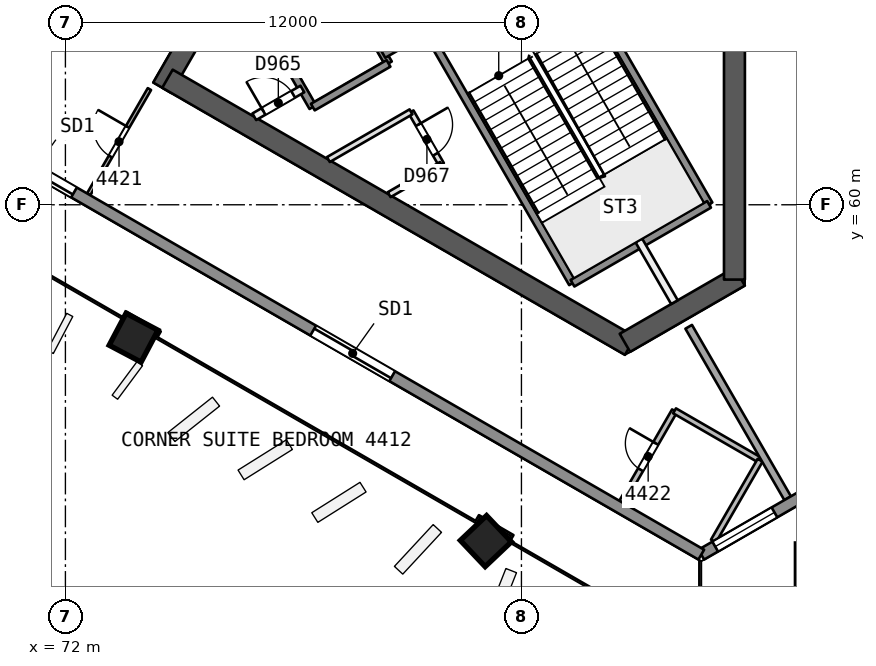
"""IFC4 building model, lengths in metres.
Left out: names, types, materials, properties, quantities, classifications, styles, units other than length and angle.
Written with IfcOpenShell. Run it as: python <this file> out.ifc"""

import sys

from ifc_helpers import new_model, si_unit, direction, frame, frame_2d, origin, origin_2d, place, context, subcontext, project, spatial, rectangle, extrude, element, fill, save


model = new_model("IFC4")
c1 = context("Model", 3, precision=1e-05, world=origin(), true_north=direction((0.0, 1.0)))
c2 = subcontext(c1, "Body", "Model", "MODEL_VIEW")
j1 = project(units=[si_unit("LENGTHUNIT", "METRE"), si_unit("PLANEANGLEUNIT", "RADIAN")], contexts=[c1])
p1 = place(None, origin())
s1 = spatial("IfcSite", under=j1, at=p1, CompositionType="ELEMENT")
p2 = place(p1, origin())
s2 = spatial("IfcBuilding", under=s1, at=p2, CompositionType="ELEMENT")
p3 = place(p2, frame((0.0, 0.0, 182.2)))
s3 = spatial("IfcBuildingStorey", under=s2, at=p3, CompositionType="ELEMENT", Elevation=182.2)
p4 = place(p3, frame((79.659, 71.931, 0.0), z_axis=(0.0, 0.0, 1.0), x_axis=(-0.500000202252, -0.866025287014, 0.0)))
e1 = element("IfcWall", 1, at=p4, inside=s3, PredefinedType="SHEAR", context=c2, shape_type="SweptSolid", body=[
    extrude(rectangle(XDim=10.221, YDim=0.55, at=frame_2d((5.111, 0.0))), origin(), (0.0, 0.0, 1.0), 3.7),
])
p5 = place(p4, frame((0.791, 0.0, 0.0)))
e2 = element("IfcOpeningElement", 2, at=p5, cuts=e1, PredefinedType="OPENING", context=c2, shape_type="SweptSolid", body=[
    extrude(rectangle(XDim=1.2, YDim=2.1, at=frame_2d((0.6, 1.05))), frame((0.0, 0.286, 0.0), z_axis=(0.0, -1.0, 0.0), x_axis=(1.0, 0.0, 0.0)), (0.0, 0.0, 1.0), 0.571),
])
p6 = place(p3, frame((74.686, 63.317, 0.0), z_axis=(0.0, 0.0, 1.0), x_axis=(0.866024505738, -0.500001555459, 0.0)))
e3 = element("IfcWall", 3, at=p6, inside=s3, PredefinedType="SHEAR", context=c2, shape_type="SweptSolid", body=[
    extrude(rectangle(XDim=14.059, YDim=0.55, at=frame_2d((7.029, 0.0))), origin(), (0.0, 0.0, 1.0), 3.7),
])
p7 = place(p3, frame((86.723, 56.367, 0.0), z_axis=(0.0, 0.0, 1.0), x_axis=(0.865997833373, 0.500047750313, 0.0)))
e4 = element("IfcWall", 4, at=p7, inside=s3, PredefinedType="SHEAR", context=c2, shape_type="SweptSolid", body=[
    extrude(rectangle(XDim=3.487, YDim=0.55, at=frame_2d((1.743, 0.0))), origin(), (0.0, 0.0, 1.0), 3.7),
])
p8 = place(p3, frame((89.605, 58.031, 0.0), z_axis=(0.0, 0.0, 1.0), x_axis=(0.0, 1.0, 0.0)))
e5 = element("IfcWall", 5, at=p8, inside=s3, PredefinedType="SHEAR", context=c2, shape_type="SweptSolid", body=[
    extrude(rectangle(XDim=14.175, YDim=0.55, at=frame_2d((7.087, 0.0))), origin(), (0.0, 0.0, 1.0), 3.7),
])
p9 = place(p3, frame((73.792, 56.475, 0.0), z_axis=(0.000857578916, 0.022824792675, 0.999739112668), x_axis=(-0.499938956565, -0.865825126557, 0.020196285069)))
e6 = element("IfcColumn", 6, at=p9, inside=s3, PredefinedType="COLUMN", context=c2, shape_type="SweptSolid", body=[
    extrude(rectangle(XDim=0.95, YDim=0.95, at=origin_2d()), origin(), (0.0, 0.0, 1.0), 3.701),
])
p10 = place(p3, frame((83.073, 51.116, 0.0), z_axis=(-0.008376454378, 0.028163354484, 0.999568237028), x_axis=(-0.500232049542, -0.86565577712, 0.020198320458)))
e7 = element("IfcColumn", 7, at=p10, inside=s3, PredefinedType="COLUMN", context=c2, shape_type="SweptSolid", body=[
    extrude(rectangle(XDim=0.95, YDim=0.95, at=origin_2d()), origin(), (0.0, 0.0, 1.0), 3.702),
])
p11 = place(p3, frame((92.355, 49.941, 0.0), z_axis=(-0.017607037296, 0.030466109479, 0.999380712447), x_axis=(0.500061328599, -0.865274797998, 0.035187946645)))
e8 = element("IfcColumn", 8, at=p11, inside=s3, PredefinedType="COLUMN", context=c2, shape_type="SweptSolid", body=[
    extrude(rectangle(XDim=2.2, YDim=2.2, at=origin_2d()), origin(), (0.0, 0.0, 1.0), 3.702),
])
p12 = place(p3, frame((88.401, 56.789, 0.0), z_axis=(0.0, 0.0, 1.0), x_axis=(0.499980796252, -0.866036490789, 0.0)))
e9 = element("IfcWall", 9, at=p12, inside=s3, PredefinedType="PARTITIONING", context=c2, shape_type="SweptSolid", body=[
    extrude(rectangle(XDim=5.208, YDim=0.2, at=frame_2d((2.604, 0.0))), origin(), (0.0, 0.0, 1.0), 3.25),
])
for number, where, z_axis, x_axis in (
    (10, (66.536, 63.781, 0.0), (0.0, 0.0, 1.0), (0.5, 0.866, 0.0)),
    (11, (69.911, 61.832, 0.0), (0.0, 0.0, 1.0), (0.5, 0.866, 0.0)),
):
    element("IfcWall", number, at=place(p3, frame(where, z_axis=z_axis, x_axis=x_axis)), inside=s3, PredefinedType="PARTITIONING", context=c2, shape_type="SweptSolid", body=[
        extrude(rectangle(XDim=11.178, YDim=0.2, at=frame_2d((5.589, 0.0))), origin(), (0.0, 0.0, 1.0), 3.25),
    ])
p13 = place(p3, frame((72.611, 60.273, 0.0), z_axis=(0.0, 0.0, 1.0), x_axis=(0.499980071345, 0.866036909293, 0.0)))
e12 = element("IfcWall", 12, at=p13, inside=s3, PredefinedType="PARTITIONING", context=c2, shape_type="SweptSolid", body=[
    extrude(rectangle(XDim=3.199, YDim=0.1, at=frame_2d((1.6, 0.0))), origin(), (0.0, 0.0, 1.0), 3.25),
])
p14 = place(p13, frame((1.15, 0.0, 0.0)))
e13 = element("IfcOpeningElement", 13, at=p14, cuts=e12, PredefinedType="OPENING", context=c2, shape_type="SweptSolid", body=[
    extrude(rectangle(XDim=0.9, YDim=2.1, at=frame_2d((0.45, 1.05))), frame((0.0, 0.061, 0.0), z_axis=(0.0, -1.0, 0.0), x_axis=(1.0, 0.0, 0.0)), (0.0, 0.0, 1.0), 0.121),
])
p15 = place(p3, frame((86.64, 52.174, 0.0), z_axis=(0.0, 0.0, 1.0), x_axis=(0.500044657716, 0.865999619105, 0.0)))
e14 = element("IfcWall", 14, at=p15, inside=s3, PredefinedType="PARTITIONING", context=c2, shape_type="SweptSolid", body=[
    extrude(rectangle(XDim=2.777, YDim=0.15, at=frame_2d((1.388, 0.0))), origin(), (0.0, 0.0, 1.0), 3.25),
])
p16 = place(p15, frame((0.988, 0.0, 0.0)))
e15 = element("IfcOpeningElement", 15, at=p16, cuts=e14, PredefinedType="OPENING", context=c2, shape_type="SweptSolid", body=[
    extrude(rectangle(XDim=0.8, YDim=2.1, at=frame_2d((0.4, 1.05))), frame((0.0, 0.085, 0.0), z_axis=(0.0, -1.0, 0.0), x_axis=(1.0, 0.0, 0.0)), (0.0, 0.0, 1.0), 0.171),
])
p17 = place(p3, frame((88.029, 54.578, 0.0), z_axis=(0.0, 0.0, 1.0), x_axis=(0.866021400173, -0.500006934395, 0.0)))
e16 = element("IfcWall", 16, at=p17, inside=s3, PredefinedType="PARTITIONING", context=c2, shape_type="SweptSolid", body=[
    extrude(rectangle(XDim=2.6, YDim=0.15, at=frame_2d((1.3, 0.0))), origin(), (0.0, 0.0, 1.0), 3.25),
])
p18 = place(p3, frame((90.281, 53.278, 0.0), z_axis=(0.0, 0.0, 1.0), x_axis=(-0.499997745557, -0.866026705384, 0.0)))
e17 = element("IfcWall", 17, at=p18, inside=s3, PredefinedType="PARTITIONING", context=c2, shape_type="SweptSolid", body=[
    extrude(rectangle(XDim=2.457, YDim=0.15, at=frame_2d((1.228, 0.0))), origin(), (0.0, 0.0, 1.0), 3.25),
])
p19 = place(p3, frame((93.427, 53.505, 0.0), z_axis=(0.0, 0.0, 1.0), x_axis=(-0.866006352826, -0.500032995777, 0.0)))
e18 = element("IfcWall", 18, at=p19, inside=s3, PredefinedType="SOLIDWALL", context=c2, shape_type="SweptSolid", body=[
    extrude(rectangle(XDim=5.422, YDim=0.3, at=frame_2d((2.711, 0.0))), origin(), (0.0, 0.0, 1.0), 3.25),
])
p20 = place(p19, frame((3.198, 0.0, 0.9)))
e19 = element("IfcOpeningElement", 19, at=p20, cuts=e18, PredefinedType="OPENING", context=c2, shape_type="SweptSolid", body=[
    extrude(rectangle(XDim=1.8, YDim=1.5, at=frame_2d((0.9, 0.75))), frame((0.0, 0.161, 0.0), z_axis=(0.0, -1.0, 0.0), x_axis=(1.0, 0.0, 0.0)), (0.0, 0.0, 1.0), 0.321),
])
p21 = place(p19, frame((0.413, 0.0, 0.9)))
e20 = element("IfcOpeningElement", 20, at=p21, cuts=e18, PredefinedType="OPENING", context=c2, shape_type="SweptSolid", body=[
    extrude(rectangle(XDim=1.8, YDim=1.5, at=frame_2d((0.9, 0.75))), frame((0.0, 0.161, 0.0), z_axis=(0.0, -1.0, 0.0), x_axis=(1.0, 0.0, 0.0)), (0.0, 0.0, 1.0), 0.321),
])
p22 = place(p3, frame((88.732, 50.794, 0.0), z_axis=(0.0, 0.0, 1.0), x_axis=(-0.866024774967, 0.500001089142, 0.0)))
e21 = element("IfcWall", 21, at=p22, inside=s3, PredefinedType="SOLIDWALL", context=c2, shape_type="SweptSolid", body=[
    extrude(rectangle(XDim=52.991, YDim=0.3, at=frame_2d((26.496, 0.0))), origin(), (0.0, 0.0, 1.0), 3.25),
])
p23 = place(p22, frame((19.06, 0.0, 0.0)))
e22 = element("IfcOpeningElement", 22, at=p23, cuts=e21, PredefinedType="OPENING", context=c2, shape_type="SweptSolid", body=[
    extrude(rectangle(XDim=2.4, YDim=2.4, at=frame_2d((1.2, 1.2))), frame((0.0, 0.161, 0.0), z_axis=(0.0, -1.0, 0.0), x_axis=(1.0, 0.0, 0.0)), (0.0, 0.0, 1.0), 0.321),
])
p24 = place(p22, frame((9.392, 0.0, 0.0)))
e23 = element("IfcOpeningElement", 23, at=p24, cuts=e21, PredefinedType="OPENING", context=c2, shape_type="SweptSolid", body=[
    extrude(rectangle(XDim=2.4, YDim=2.4, at=frame_2d((1.2, 1.2))), frame((0.0, 0.161, 0.0), z_axis=(0.0, -1.0, 0.0), x_axis=(1.0, 0.0, 0.0)), (0.0, 0.0, 1.0), 0.321),
])
p25 = place(p22, frame((40.145, 0.0, 0.0)))
e24 = element("IfcOpeningElement", 24, at=p25, cuts=e21, PredefinedType="OPENING", context=c2, shape_type="SweptSolid", body=[
    extrude(rectangle(XDim=2.4, YDim=2.4, at=frame_2d((1.2, 1.2))), frame((0.0, 0.161, 0.0), z_axis=(0.0, -1.0, 0.0), x_axis=(1.0, 0.0, 0.0)), (0.0, 0.0, 1.0), 0.321),
])
p26 = place(p22, frame((26.765, 0.0, 0.9)))
e25 = element("IfcOpeningElement", 25, at=p26, cuts=e21, PredefinedType="OPENING", context=c2, shape_type="SweptSolid", body=[
    extrude(rectangle(XDim=1.8, YDim=1.5, at=frame_2d((0.9, 0.75))), frame((0.0, 0.161, 0.0), z_axis=(0.0, -1.0, 0.0), x_axis=(1.0, 0.0, 0.0)), (0.0, 0.0, 1.0), 0.321),
])
p27 = place(p22, frame((22.867, 0.0, 0.9)))
e26 = element("IfcOpeningElement", 26, at=p27, cuts=e21, PredefinedType="OPENING", context=c2, shape_type="SweptSolid", body=[
    extrude(rectangle(XDim=1.8, YDim=1.5, at=frame_2d((0.9, 0.75))), frame((0.0, 0.161, 0.0), z_axis=(0.0, -1.0, 0.0), x_axis=(1.0, 0.0, 0.0)), (0.0, 0.0, 1.0), 0.321),
])
p28 = place(p3, frame((77.135, 64.952, 0.0), z_axis=(0.0, 0.0, 1.0), x_axis=(0.499996545922, -0.866027397988, 0.0)))
e27 = element("IfcWall", 27, at=p28, inside=s3, PredefinedType="SOLIDWALL", context=c2, shape_type="SweptSolid", body=[
    extrude(rectangle(XDim=2.75, YDim=0.2, at=frame_2d((1.375, 0.0))), origin(), (0.0, 0.0, 1.0), 3.25),
])
p29 = place(p3, frame((81.094, 62.445, 0.0), z_axis=(0.0, 0.0, 1.0), x_axis=(0.499880961361, -0.866094119867, 0.0)))
e28 = element("IfcWall", 28, at=p29, inside=s3, PredefinedType="PARTITIONING", context=c2, shape_type="SweptSolid", body=[
    extrude(rectangle(XDim=1.6, YDim=0.15, at=frame_2d((0.8, 0.0))), origin(), (0.0, 0.0, 1.0), 3.25),
])
p30 = place(p29, frame((0.387, 0.0, 0.0)))
e29 = element("IfcOpeningElement", 29, at=p30, cuts=e28, PredefinedType="OPENING", context=c2, shape_type="SweptSolid", body=[
    extrude(rectangle(XDim=0.9, YDim=2.1, at=frame_2d((0.45, 1.05))), frame((0.0, 0.085, 0.0), z_axis=(0.0, -1.0, 0.0), x_axis=(1.0, 0.0, 0.0)), (0.0, 0.0, 1.0), 0.171),
])
p31 = place(p3, frame((79.127, 66.102, 0.0), z_axis=(0.0, 0.0, 1.0), x_axis=(0.499996545922, -0.866027397988, 0.0)))
e30 = element("IfcWall", 30, at=p31, inside=s3, PredefinedType="SOLIDWALL", context=c2, shape_type="SweptSolid", body=[
    extrude(rectangle(XDim=2.75, YDim=0.2, at=frame_2d((1.375, 0.0))), origin(), (0.0, 0.0, 1.0), 3.25),
])
p32 = place(p3, frame((81.493, 64.604, 0.0), z_axis=(0.0, 0.0, 1.0), x_axis=(0.500006057782, -0.866021906294, 0.0)))
e31 = element("IfcWall", 31, at=p32, inside=s3, PredefinedType="SOLIDWALL", context=c2, shape_type="SweptSolid", body=[
    extrude(rectangle(XDim=7.7, YDim=0.2, at=frame_2d((3.85, 0.0))), origin(), (0.0, 0.0, 1.0), 3.25),
])
p33 = place(p3, frame((87.09, 59.06, 0.0), z_axis=(0.0, 0.0, 1.0), x_axis=(0.499951854219, -0.86605319898, 0.0)))
e32 = element("IfcWall", 32, at=p33, inside=s3, PredefinedType="PARTITIONING", context=c2, shape_type="SweptSolid", body=[
    extrude(rectangle(XDim=1.873, YDim=0.2, at=frame_2d((0.937, 0.0))), origin(), (0.0, 0.0, 1.0), 3.25),
])
p34 = place(p3, frame((85.087, 66.679, 0.0), z_axis=(0.0, 0.0, 1.0), x_axis=(0.500019787375, -0.866013979237, 0.0)))
e33 = element("IfcWall", 33, at=p34, inside=s3, PredefinedType="SOLIDWALL", context=c2, shape_type="SweptSolid", body=[
    extrude(rectangle(XDim=7.7, YDim=0.2, at=frame_2d((3.85, 0.0))), origin(), (0.0, 0.0, 1.0), 3.25),
])
p35 = place(p34, frame((0.55, 0.0, 0.0)))
e34 = element("IfcOpeningElement", 34, at=p35, cuts=e33, PredefinedType="OPENING", context=c2, shape_type="SweptSolid", body=[
    extrude(rectangle(XDim=1.1, YDim=2.1, at=frame_2d((0.55, 1.05))), frame((0.0, 0.11, 0.0), z_axis=(0.0, -1.0, 0.0), x_axis=(1.0, 0.0, 0.0)), (0.0, 0.0, 1.0), 0.221),
])
p36 = place(p3, frame((76.97, 62.316, 0.0), z_axis=(0.0, 0.0, 1.0), x_axis=(0.865982457891, 0.500074377092, 0.0)))
e35 = element("IfcWall", 35, at=p36, inside=s3, PredefinedType="PARTITIONING", context=c2, shape_type="SweptSolid", body=[
    extrude(rectangle(XDim=1.461, YDim=0.2, at=frame_2d((0.73, 0.0))), origin(), (0.0, 0.0, 1.0), 3.25),
])
p37 = place(p36, frame((0.281, 0.0, 0.0)))
e36 = element("IfcOpeningElement", 36, at=p37, cuts=e35, PredefinedType="OPENING", context=c2, shape_type="SweptSolid", body=[
    extrude(rectangle(XDim=0.9, YDim=2.1, at=frame_2d((0.45, 1.05))), frame((0.0, 0.11, 0.0), z_axis=(0.0, -1.0, 0.0), x_axis=(1.0, 0.0, 0.0)), (0.0, 0.0, 1.0), 0.221),
])
p38 = place(p3, frame((80.367, 63.954, 0.0), z_axis=(0.0, 0.0, 1.0), x_axis=(0.866026575979, 0.499997969693, 0.0)))
e37 = element("IfcWall", 37, at=p38, inside=s3, PredefinedType="SOLIDWALL", context=c2, shape_type="SweptSolid", body=[
    extrude(rectangle(XDim=6.75, YDim=0.2, at=frame_2d((3.375, 0.0))), origin(), (0.0, 0.0, 1.0), 3.25),
])
p39 = place(p3, frame((78.51, 62.57, 0.0), z_axis=(0.0, 0.0, 1.0), x_axis=(0.866053019151, 0.499952165731, 0.0)))
e38 = element("IfcWall", 38, at=p39, inside=s3, PredefinedType="SOLIDWALL", context=c2, shape_type="SweptSolid", body=[
    extrude(rectangle(XDim=2.3, YDim=0.2, at=frame_2d((1.15, 0.0))), origin(), (0.0, 0.0, 1.0), 3.25),
])
p40 = place(p3, frame((78.92, 61.19, 0.0), z_axis=(0.0, 0.0, 1.0), x_axis=(0.866038211682, 0.499977815414, 0.0)))
e39 = element("IfcWall", 39, at=p40, inside=s3, PredefinedType="PARTITIONING", context=c2, shape_type="SweptSolid", body=[
    extrude(rectangle(XDim=2.51, YDim=0.15, at=frame_2d((1.255, 0.0))), origin(), (0.0, 0.0, 1.0), 3.25),
])
p41 = place(p3, frame((80.52, 60.266, 0.0), z_axis=(0.0, 0.0, 1.0), x_axis=(0.866008740531, 0.500028860491, 0.0)))
e40 = element("IfcWall", 40, at=p41, inside=s3, PredefinedType="PARTITIONING", context=c2, shape_type="SweptSolid", body=[
    extrude(rectangle(XDim=1.586, YDim=0.15, at=frame_2d((0.793, 0.0))), origin(), (0.0, 0.0, 1.0), 3.25),
])
p42 = place(p3, frame((85.343, 57.935, 0.0), z_axis=(0.0, 0.0, 1.0), x_axis=(0.866004344652, 0.500036473714, 0.0)))
e41 = element("IfcWall", 41, at=p42, inside=s3, PredefinedType="SOLIDWALL", context=c2, shape_type="SweptSolid", body=[
    extrude(rectangle(XDim=4.15, YDim=0.2, at=frame_2d((2.075, 0.0))), origin(), (0.0, 0.0, 1.0), 3.25),
])
p43 = place(p14, origin())
e42 = element("IfcDoor", 42, at=p43, inside=s3, OperationType="SINGLE_SWING_RIGHT", PredefinedType="NOTDEFINED", context=c2, shape_type="SweptSolid", body=[
    extrude(rectangle(XDim=0.9, YDim=2.1, at=frame_2d((0.45, 1.05))), frame((0.0, 0.025, 0.0), z_axis=(0.0, -1.0, 0.0), x_axis=(1.0, 0.0, 0.0)), (0.0, 0.0, 1.0), 0.05),
])
fill(e13, e42)
p44 = place(p16, origin())
e43 = element("IfcDoor", 43, at=p44, inside=s3, OperationType="SINGLE_SWING_RIGHT", PredefinedType="NOTDEFINED", context=c2, shape_type="SweptSolid", body=[
    extrude(rectangle(XDim=0.8, YDim=2.1, at=frame_2d((0.4, 1.05))), frame((0.0, 0.025, 0.0), z_axis=(0.0, -1.0, 0.0), x_axis=(1.0, 0.0, 0.0)), (0.0, 0.0, 1.0), 0.05),
])
fill(e15, e43)
p45 = place(p20, origin())
e44 = element("IfcWindow", 44, at=p45, inside=s3, PartitioningType="SINGLE_PANEL", PredefinedType="WINDOW", context=c2, shape_type="SweptSolid", body=[
    extrude(rectangle(XDim=1.8, YDim=1.5, at=frame_2d((0.9, 0.75))), frame((0.0, 0.03, 0.0), z_axis=(0.0, -1.0, 0.0), x_axis=(1.0, 0.0, 0.0)), (0.0, 0.0, 1.0), 0.06),
])
fill(e19, e44)
p46 = place(p23, origin())
e45 = element("IfcDoor", 45, at=p46, inside=s3, OperationType="SLIDING_TO_LEFT", PredefinedType="NOTDEFINED", context=c2, shape_type="SweptSolid", body=[
    extrude(rectangle(XDim=2.4, YDim=2.4, at=frame_2d((1.2, 1.2))), frame((0.0, 0.025, 0.0), z_axis=(0.0, -1.0, 0.0), x_axis=(1.0, 0.0, 0.0)), (0.0, 0.0, 1.0), 0.05),
])
fill(e22, e45)
p47 = place(p24, origin())
e46 = element("IfcDoor", 46, at=p47, inside=s3, OperationType="SLIDING_TO_RIGHT", PredefinedType="NOTDEFINED", context=c2, shape_type="SweptSolid", body=[
    extrude(rectangle(XDim=2.4, YDim=2.4, at=frame_2d((1.2, 1.2))), frame((0.0, 0.025, 0.0), z_axis=(0.0, -1.0, 0.0), x_axis=(1.0, 0.0, 0.0)), (0.0, 0.0, 1.0), 0.05),
])
fill(e23, e46)
p48 = place(p37, origin())
e47 = element("IfcDoor", 47, at=p48, inside=s3, OperationType="SINGLE_SWING_LEFT", PredefinedType="NOTDEFINED", context=c2, shape_type="SweptSolid", body=[
    extrude(rectangle(XDim=0.9, YDim=2.1, at=frame_2d((0.45, 1.05))), frame((0.0, 0.025, 0.0), z_axis=(0.0, -1.0, 0.0), x_axis=(1.0, 0.0, 0.0)), (0.0, 0.0, 1.0), 0.05),
])
fill(e36, e47)
p49 = place(p30, origin())
e48 = element("IfcDoor", 48, at=p49, inside=s3, OperationType="SINGLE_SWING_LEFT", PredefinedType="NOTDEFINED", context=c2, shape_type="SweptSolid", body=[
    extrude(rectangle(XDim=0.9, YDim=2.1, at=frame_2d((0.45, 1.05))), frame((0.0, 0.025, 0.0), z_axis=(0.0, -1.0, 0.0), x_axis=(1.0, 0.0, 0.0)), (0.0, 0.0, 1.0), 0.05),
])
fill(e29, e48)
save(model, sys.argv[1])
